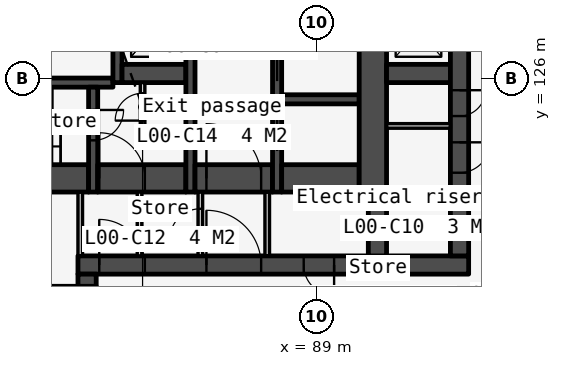
"""IFC4 building model, lengths in metres.
Left out: names, types, materials, properties, quantities, classifications, styles, units other than length and angle.
Written with IfcOpenShell. Run it as: python <this file> out.ifc"""

import sys

from ifc_helpers import new_model, si_unit, direction, frame, frame_2d, origin, place, context, subcontext, project, spatial, rectangle, extrude, element, fill, save


model = new_model("IFC4")
c1 = context("Model", 3, precision=1e-05, world=origin(), true_north=direction((0.0, 1.0)))
c2 = subcontext(c1, "Body", "Model", "MODEL_VIEW")
j1 = project(units=[si_unit("LENGTHUNIT", "METRE"), si_unit("PLANEANGLEUNIT", "RADIAN")], contexts=[c1])
p1 = place(None, origin())
s1 = spatial("IfcSite", under=j1, at=p1, CompositionType="ELEMENT")
p2 = place(p1, origin())
s2 = spatial("IfcBuilding", under=s1, at=p2, CompositionType="ELEMENT")
p3 = place(p2, origin())
s3 = spatial("IfcBuildingStorey", under=s2, at=p3, CompositionType="ELEMENT", Elevation=0.0)
p4 = place(p3, frame((74.3, 118.85, 0.0), z_axis=(0.0, 0.0, 1.0), x_axis=(1.0, 0.0, 0.0)))
e1 = element("IfcWall", 1, at=p4, inside=s3, PredefinedType="SOLIDWALL", context=c2, shape_type="SweptSolid", body=[
    extrude(rectangle(XDim=7.45, YDim=0.6, at=frame_2d((3.725, 0.0))), origin(), (0.0, 0.0, 1.0), 7.2),
])
p5 = place(p4, frame((3.225, 0.0, 0.0)))
e2 = element("IfcOpeningElement", 2, at=p5, cuts=e1, PredefinedType="OPENING", context=c2, shape_type="SweptSolid", body=[
    extrude(rectangle(XDim=1.0, YDim=2.1, at=frame_2d((0.5, 1.05))), frame((0.0, 0.31, 0.0), z_axis=(0.0, -1.0, 0.0), x_axis=(1.0, 0.0, 0.0)), (0.0, 0.0, 1.0), 0.62),
])
p6 = place(p3, frame((75.3, 122.7, 0.0), z_axis=(0.0, 0.0, 1.0), x_axis=(1.0, 0.0, 0.0)))
e3 = element("IfcWall", 3, at=p6, inside=s3, PredefinedType="SOLIDWALL", context=c2, shape_type="SweptSolid", body=[
    extrude(rectangle(XDim=6.2, YDim=0.9, at=frame_2d((3.1, 0.0))), origin(), (0.0, 0.0, 1.0), 7.2),
])
p7 = place(p3, frame((77.7, 125.85, 0.0), z_axis=(0.0, 0.0, 1.0), x_axis=(1.0, 0.0, 0.0)))
e4 = element("IfcWall", 4, at=p7, inside=s3, PredefinedType="SOLIDWALL", context=c2, shape_type="SweptSolid", body=[
    extrude(rectangle(XDim=4.6, YDim=0.3, at=frame_2d((2.3, 0.0))), origin(), (0.0, 0.0, 1.0), 7.2),
])
p8 = place(p3, frame((81.225, 122.25, 0.0), z_axis=(0.0, 0.0, 1.0), x_axis=(0.0, -1.0, 0.0)))
e5 = element("IfcWall", 5, at=p8, inside=s3, PredefinedType="PARTITIONING", context=c2, shape_type="SweptSolid", body=[
    extrude(rectangle(XDim=2.1, YDim=0.15, at=frame_2d((1.05, 0.0))), origin(), (0.0, 0.0, 1.0), 7.2),
])
p9 = place(p3, frame((81.15, 119.85, 0.0), z_axis=(0.0, 0.0, 1.0), x_axis=(1.0, 0.0, 0.0)))
e6 = element("IfcWall", 6, at=p9, inside=s3, PredefinedType="SOLIDWALL", context=c2, shape_type="SweptSolid", body=[
    extrude(rectangle(XDim=12.85, YDim=0.6, at=frame_2d((6.425, 0.0))), origin(), (0.0, 0.0, 1.0), 7.2),
])
p10 = place(p9, frame((0.7, 0.0, 0.0)))
e7 = element("IfcOpeningElement", 7, at=p10, cuts=e6, PredefinedType="OPENING", context=c2, shape_type="SweptSolid", body=[
    extrude(rectangle(XDim=1.5, YDim=2.1, at=frame_2d((0.75, 1.05))), frame((0.0, 0.31, 0.0), z_axis=(0.0, -1.0, 0.0), x_axis=(1.0, 0.0, 0.0)), (0.0, 0.0, 1.0), 0.62),
])
p11 = place(p9, frame((4.225, 0.0, 0.0)))
e8 = element("IfcOpeningElement", 8, at=p11, cuts=e6, PredefinedType="OPENING", context=c2, shape_type="SweptSolid", body=[
    extrude(rectangle(XDim=1.8, YDim=2.1, at=frame_2d((0.9, 1.05))), frame((0.0, 0.31, 0.0), z_axis=(0.0, -1.0, 0.0), x_axis=(1.0, 0.0, 0.0)), (0.0, 0.0, 1.0), 0.62),
])
p12 = place(p9, frame((7.425, 0.0, 0.0)))
e9 = element("IfcOpeningElement", 9, at=p12, cuts=e6, PredefinedType="OPENING", context=c2, shape_type="SweptSolid", body=[
    extrude(rectangle(XDim=1.0, YDim=2.1, at=frame_2d((0.5, 1.05))), frame((0.0, 0.31, 0.0), z_axis=(0.0, -1.0, 0.0), x_axis=(1.0, 0.0, 0.0)), (0.0, 0.0, 1.0), 0.62),
])
p13 = place(p3, frame((81.15, 119.35, 0.0), z_axis=(0.0, 0.0, 1.0), x_axis=(1.0, 0.0, 0.0)))
e10 = element("IfcWall", 10, at=p13, inside=s3, PredefinedType="SOLIDWALL", context=c2, shape_type="SweptSolid", body=[
    extrude(rectangle(XDim=0.6, YDim=0.4, at=frame_2d((0.3, 0.0))), origin(), (0.0, 0.0, 1.0), 7.2),
])
p14 = place(p3, frame((81.65, 125.7, 0.0), z_axis=(0.0, 0.0, 1.0), x_axis=(0.0, -1.0, 0.0)))
e11 = element("IfcWall", 11, at=p14, inside=s3, PredefinedType="SOLIDWALL", context=c2, shape_type="SweptSolid", body=[
    extrude(rectangle(XDim=3.45, YDim=0.3, at=frame_2d((1.725, 0.0))), origin(), (0.0, 0.0, 1.0), 7.2),
])
p15 = place(p14, frame((0.75, 0.0, 0.0)))
e12 = element("IfcOpeningElement", 12, at=p15, cuts=e11, PredefinedType="OPENING", context=c2, shape_type="SweptSolid", body=[
    extrude(rectangle(XDim=1.0, YDim=2.1, at=frame_2d((0.5, 1.05))), frame((0.0, 0.16, 0.0), z_axis=(0.0, -1.0, 0.0), x_axis=(1.0, 0.0, 0.0)), (0.0, 0.0, 1.0), 0.32),
])
p16 = place(p3, frame((81.8, 122.7, 0.0), z_axis=(0.0, 0.0, 1.0), x_axis=(1.0, 0.0, 0.0)))
e13 = element("IfcWall", 13, at=p16, inside=s3, PredefinedType="SOLIDWALL", context=c2, shape_type="SweptSolid", body=[
    extrude(rectangle(XDim=2.9, YDim=0.9, at=frame_2d((1.45, 0.0))), origin(), (0.0, 0.0, 1.0), 7.2),
])
p17 = place(p16, frame((0.05, 0.0, 0.0)))
e14 = element("IfcOpeningElement", 14, at=p17, cuts=e13, PredefinedType="OPENING", context=c2, shape_type="SweptSolid", body=[
    extrude(rectangle(XDim=1.5, YDim=2.1, at=frame_2d((0.75, 1.05))), frame((0.0, 0.46, 0.0), z_axis=(0.0, -1.0, 0.0), x_axis=(1.0, 0.0, 0.0)), (0.0, 0.0, 1.0), 0.92),
])
p18 = place(p3, frame((82.45, 133.95, 0.0), z_axis=(0.0, 0.0, 1.0), x_axis=(0.0, -1.0, 0.0)))
e15 = element("IfcWall", 15, at=p18, inside=s3, PredefinedType="SOLIDWALL", context=c2, shape_type="SweptSolid", body=[
    extrude(rectangle(XDim=8.1, YDim=0.3, at=frame_2d((4.05, 0.0))), origin(), (0.0, 0.0, 1.0), 7.2),
])
p19 = place(p18, frame((0.6, 0.0, 0.0)))
e16 = element("IfcOpeningElement", 16, at=p19, cuts=e15, PredefinedType="OPENING", context=c2, shape_type="SweptSolid", body=[
    extrude(rectangle(XDim=1.1, YDim=2.1, at=frame_2d((0.55, 1.05))), frame((0.0, 0.16, 0.0), z_axis=(0.0, -1.0, 0.0), x_axis=(1.0, 0.0, 0.0)), (0.0, 0.0, 1.0), 0.32),
])
p20 = place(p18, frame((3.2, 0.0, 0.0)))
e17 = element("IfcOpeningElement", 17, at=p20, cuts=e15, PredefinedType="OPENING", context=c2, shape_type="SweptSolid", body=[
    extrude(rectangle(XDim=1.1, YDim=2.1, at=frame_2d((0.55, 1.05))), frame((0.0, 0.16, 0.0), z_axis=(0.0, -1.0, 0.0), x_axis=(1.0, 0.0, 0.0)), (0.0, 0.0, 1.0), 0.32),
])
p21 = place(p18, frame((5.8, 0.0, 0.0)))
e18 = element("IfcOpeningElement", 18, at=p21, cuts=e15, PredefinedType="OPENING", context=c2, shape_type="SweptSolid", body=[
    extrude(rectangle(XDim=1.1, YDim=2.1, at=frame_2d((0.55, 1.05))), frame((0.0, 0.16, 0.0), z_axis=(0.0, -1.0, 0.0), x_axis=(1.0, 0.0, 0.0)), (0.0, 0.0, 1.0), 0.32),
])
p22 = place(p3, frame((82.6, 126.15, 0.0), z_axis=(0.0, 0.0, 1.0), x_axis=(1.0, 0.0, 0.0)))
e19 = element("IfcWall", 19, at=p22, inside=s3, PredefinedType="SOLIDWALL", context=c2, shape_type="SweptSolid", body=[
    extrude(rectangle(XDim=2.1, YDim=0.6, at=frame_2d((1.05, 0.0))), origin(), (0.0, 0.0, 1.0), 7.2),
])
p23 = place(p3, frame((83.175, 122.25, 0.0), z_axis=(0.0, 0.0, 1.0), x_axis=(0.0, -1.0, 0.0)))
e20 = element("IfcWall", 20, at=p23, inside=s3, PredefinedType="PARTITIONING", context=c2, shape_type="SweptSolid", body=[
    extrude(rectangle(XDim=2.1, YDim=0.15, at=frame_2d((1.05, 0.0))), origin(), (0.0, 0.0, 1.0), 7.2),
])
p24 = place(p3, frame((83.275, 125.85, 0.0), z_axis=(0.0, 0.0, 1.0), x_axis=(0.0, -1.0, 0.0)))
e21 = element("IfcWall", 21, at=p24, inside=s3, PredefinedType="PARTITIONING", context=c2, shape_type="SweptSolid", body=[
    extrude(rectangle(XDim=1.75, YDim=0.15, at=frame_2d((0.875, 0.0))), origin(), (0.0, 0.0, 1.0), 7.2),
])
p25 = place(p24, frame((0.35, 0.0, 0.0)))
e22 = element("IfcOpeningElement", 22, at=p25, cuts=e21, PredefinedType="OPENING", context=c2, shape_type="SweptSolid", body=[
    extrude(rectangle(XDim=0.9, YDim=2.1, at=frame_2d((0.45, 1.05))), frame((0.0, 0.085, 0.0), z_axis=(0.0, -1.0, 0.0), x_axis=(1.0, 0.0, 0.0)), (0.0, 0.0, 1.0), 0.17),
])
p26 = place(p3, frame((83.35, 124.175, 0.0), z_axis=(0.0, 0.0, 1.0), x_axis=(1.0, 0.0, 0.0)))
e23 = element("IfcWall", 23, at=p26, inside=s3, PredefinedType="PARTITIONING", context=c2, shape_type="SweptSolid", body=[
    extrude(rectangle(XDim=1.35, YDim=0.15, at=frame_2d((0.675, 0.0))), origin(), (0.0, 0.0, 1.0), 7.2),
])
p27 = place(p3, frame((84.85, 133.95, 0.0), z_axis=(0.0, 0.0, 1.0), x_axis=(0.0, -1.0, 0.0)))
e24 = element("IfcWall", 24, at=p27, inside=s3, PredefinedType="SOLIDWALL", context=c2, shape_type="SweptSolid", body=[
    extrude(rectangle(XDim=11.7, YDim=0.3, at=frame_2d((5.85, 0.0))), origin(), (0.0, 0.0, 1.0), 7.2),
])
p28 = place(p3, frame((85.0, 122.7, 0.0), z_axis=(0.0, 0.0, 1.0), x_axis=(1.0, 0.0, 0.0)))
e25 = element("IfcWall", 25, at=p28, inside=s3, PredefinedType="SOLIDWALL", context=c2, shape_type="SweptSolid", body=[
    extrude(rectangle(XDim=2.55, YDim=0.9, at=frame_2d((1.275, 0.0))), origin(), (0.0, 0.0, 1.0), 7.2),
])
p29 = place(p28, frame((0.375, 0.0, 0.0)))
e26 = element("IfcOpeningElement", 26, at=p29, cuts=e25, PredefinedType="OPENING", context=c2, shape_type="SweptSolid", body=[
    extrude(rectangle(XDim=1.8, YDim=2.1, at=frame_2d((0.9, 1.05))), frame((0.0, 0.46, 0.0), z_axis=(0.0, -1.0, 0.0), x_axis=(1.0, 0.0, 0.0)), (0.0, 0.0, 1.0), 0.92),
])
p30 = place(p3, frame((85.175, 122.25, 0.0), z_axis=(0.0, 0.0, 1.0), x_axis=(0.0, -1.0, 0.0)))
e27 = element("IfcWall", 27, at=p30, inside=s3, PredefinedType="PARTITIONING", context=c2, shape_type="SweptSolid", body=[
    extrude(rectangle(XDim=2.1, YDim=0.15, at=frame_2d((1.05, 0.0))), origin(), (0.0, 0.0, 1.0), 7.2),
])
p31 = place(p30, frame((0.55, 0.0, 0.0)))
e28 = element("IfcOpeningElement", 28, at=p31, cuts=e27, PredefinedType="OPENING", context=c2, shape_type="SweptSolid", body=[
    extrude(rectangle(XDim=1.0, YDim=2.1, at=frame_2d((0.5, 1.05))), frame((0.0, 0.085, 0.0), z_axis=(0.0, -1.0, 0.0), x_axis=(1.0, 0.0, 0.0)), (0.0, 0.0, 1.0), 0.17),
])
p32 = place(p3, frame((87.375, 122.25, 0.0), z_axis=(0.0, 0.0, 1.0), x_axis=(0.0, -1.0, 0.0)))
e29 = element("IfcWall", 29, at=p32, inside=s3, PredefinedType="PARTITIONING", context=c2, shape_type="SweptSolid", body=[
    extrude(rectangle(XDim=2.1, YDim=0.15, at=frame_2d((1.05, 0.0))), origin(), (0.0, 0.0, 1.0), 7.2),
])
p33 = place(p3, frame((87.7, 133.95, 0.0), z_axis=(0.0, 0.0, 1.0), x_axis=(0.0, -1.0, 0.0)))
e30 = element("IfcWall", 30, at=p33, inside=s3, PredefinedType="SOLIDWALL", context=c2, shape_type="SweptSolid", body=[
    extrude(rectangle(XDim=11.7, YDim=0.3, at=frame_2d((5.85, 0.0))), origin(), (0.0, 0.0, 1.0), 7.2),
])
p34 = place(p33, frame((6.95, 0.0, 0.0)))
e31 = element("IfcOpeningElement", 31, at=p34, cuts=e30, PredefinedType="OPENING", context=c2, shape_type="SweptSolid", body=[
    extrude(rectangle(XDim=1.1, YDim=2.1, at=frame_2d((0.55, 1.05))), frame((0.0, 0.16, 0.0), z_axis=(0.0, -1.0, 0.0), x_axis=(1.0, 0.0, 0.0)), (0.0, 0.0, 1.0), 0.32),
])
p35 = place(p33, frame((5.1, 0.0, 0.0)))
e32 = element("IfcOpeningElement", 32, at=p35, cuts=e30, PredefinedType="OPENING", context=c2, shape_type="SweptSolid", body=[
    extrude(rectangle(XDim=1.0, YDim=2.1, at=frame_2d((0.5, 1.05))), frame((0.0, 0.16, 0.0), z_axis=(0.0, -1.0, 0.0), x_axis=(1.0, 0.0, 0.0)), (0.0, 0.0, 1.0), 0.32),
])
p36 = place(p33, frame((9.25, 0.0, 0.0)))
e33 = element("IfcOpeningElement", 33, at=p36, cuts=e30, PredefinedType="OPENING", context=c2, shape_type="SweptSolid", body=[
    extrude(rectangle(XDim=1.1, YDim=2.1, at=frame_2d((0.55, 1.05))), frame((0.0, 0.16, 0.0), z_axis=(0.0, -1.0, 0.0), x_axis=(1.0, 0.0, 0.0)), (0.0, 0.0, 1.0), 0.32),
])
p37 = place(p3, frame((87.85, 125.3, 0.0), z_axis=(0.0, 0.0, 1.0), x_axis=(1.0, 0.0, 0.0)))
e34 = element("IfcWall", 34, at=p37, inside=s3, PredefinedType="SOLIDWALL", context=c2, shape_type="SweptSolid", body=[
    extrude(rectangle(XDim=2.55, YDim=0.3, at=frame_2d((1.275, 0.0))), origin(), (0.0, 0.0, 1.0), 7.2),
])
p38 = place(p3, frame((87.85, 122.7, 0.0), z_axis=(0.0, 0.0, 1.0), x_axis=(1.0, 0.0, 0.0)))
e35 = element("IfcWall", 35, at=p38, inside=s3, PredefinedType="SOLIDWALL", context=c2, shape_type="SweptSolid", body=[
    extrude(rectangle(XDim=2.55, YDim=0.9, at=frame_2d((1.275, 0.0))), origin(), (0.0, 0.0, 1.0), 7.2),
])
p39 = place(p3, frame((90.85, 133.95, 0.0), z_axis=(0.0, 0.0, 1.0), x_axis=(0.0, -1.0, 0.0)))
e36 = element("IfcWall", 36, at=p39, inside=s3, PredefinedType="SOLIDWALL", context=c2, shape_type="SweptSolid", body=[
    extrude(rectangle(XDim=11.7, YDim=0.9, at=frame_2d((5.85, 0.0))), origin(), (0.0, 0.0, 1.0), 7.2),
])
p40 = place(p3, frame((91.0, 122.25, 0.0), z_axis=(0.0, 0.0, 1.0), x_axis=(0.0, -1.0, 0.0)))
e37 = element("IfcWall", 37, at=p40, inside=s3, PredefinedType="SOLIDWALL", context=c2, shape_type="SweptSolid", body=[
    extrude(rectangle(XDim=2.1, YDim=0.6, at=frame_2d((1.05, 0.0))), origin(), (0.0, 0.0, 1.0), 7.2),
])
p41 = place(p3, frame((91.3, 126.15, 0.0), z_axis=(0.0, 0.0, 1.0), x_axis=(1.0, 0.0, 0.0)))
e38 = element("IfcWall", 38, at=p41, inside=s3, PredefinedType="SOLIDWALL", context=c2, shape_type="SweptSolid", body=[
    extrude(rectangle(XDim=2.1, YDim=0.6, at=frame_2d((1.05, 0.0))), origin(), (0.0, 0.0, 1.0), 7.2),
])
for number, where, z_axis, x_axis in (
    (39, (91.3, 124.425, 0.0), (0.0, 0.0, 1.0), (1.0, 0.0, 0.0)),
    (40, (91.3, 122.346, 0.0), (0.0, 0.0, 1.0), (1.0, 0.0, 0.0)),
):
    element("IfcWall", number, at=place(p3, frame(where, z_axis=z_axis, x_axis=x_axis)), inside=s3, PredefinedType="PARTITIONING", context=c2, shape_type="SweptSolid", body=[
        extrude(rectangle(XDim=2.1, YDim=0.15, at=frame_2d((1.05, 0.0))), origin(), (0.0, 0.0, 1.0), 7.2),
    ])
p42 = place(p3, frame((93.7, 133.95, 0.0), z_axis=(0.0, 0.0, 1.0), x_axis=(0.0, -1.0, 0.0)))
e41 = element("IfcWall", 41, at=p42, inside=s3, PredefinedType="SOLIDWALL", context=c2, shape_type="SweptSolid", body=[
    extrude(rectangle(XDim=13.8, YDim=0.6, at=frame_2d((6.9, 0.0))), origin(), (0.0, 0.0, 1.0), 7.2),
])
p43 = place(p42, frame((0.6, 0.0, 0.0)))
e42 = element("IfcOpeningElement", 42, at=p43, cuts=e41, PredefinedType="OPENING", context=c2, shape_type="SweptSolid", body=[
    extrude(rectangle(XDim=1.1, YDim=2.1, at=frame_2d((0.55, 1.05))), frame((0.0, 0.31, 0.0), z_axis=(0.0, -1.0, 0.0), x_axis=(1.0, 0.0, 0.0)), (0.0, 0.0, 1.0), 0.62),
])
p44 = place(p42, frame((10.064, 0.0, 0.0)))
e43 = element("IfcOpeningElement", 43, at=p44, cuts=e41, PredefinedType="OPENING", context=c2, shape_type="SweptSolid", body=[
    extrude(rectangle(XDim=1.0, YDim=2.1, at=frame_2d((0.5, 1.05))), frame((0.0, 0.31, 0.0), z_axis=(0.0, -1.0, 0.0), x_axis=(1.0, 0.0, 0.0)), (0.0, 0.0, 1.0), 0.62),
])
p45 = place(p42, frame((8.35, 0.0, 0.0)))
e44 = element("IfcOpeningElement", 44, at=p45, cuts=e41, PredefinedType="OPENING", context=c2, shape_type="SweptSolid", body=[
    extrude(rectangle(XDim=0.85, YDim=2.1, at=frame_2d((0.425, 1.05))), frame((0.0, 0.31, 0.0), z_axis=(0.0, -1.0, 0.0), x_axis=(1.0, 0.0, 0.0)), (0.0, 0.0, 1.0), 0.62),
])
p46 = place(p42, frame((12.239, 0.0, 0.0)))
e45 = element("IfcOpeningElement", 45, at=p46, cuts=e41, PredefinedType="OPENING", context=c2, shape_type="SweptSolid", body=[
    extrude(rectangle(XDim=1.0, YDim=2.1, at=frame_2d((0.5, 1.05))), frame((0.0, 0.31, 0.0), z_axis=(0.0, -1.0, 0.0), x_axis=(1.0, 0.0, 0.0)), (0.0, 0.0, 1.0), 0.62),
])
p47 = place(p42, frame((3.2, 0.0, 0.0)))
e46 = element("IfcOpeningElement", 46, at=p47, cuts=e41, PredefinedType="OPENING", context=c2, shape_type="SweptSolid", body=[
    extrude(rectangle(XDim=1.1, YDim=2.1, at=frame_2d((0.55, 1.05))), frame((0.0, 0.31, 0.0), z_axis=(0.0, -1.0, 0.0), x_axis=(1.0, 0.0, 0.0)), (0.0, 0.0, 1.0), 0.62),
])
p48 = place(p42, frame((5.8, 0.0, 0.0)))
e47 = element("IfcOpeningElement", 47, at=p48, cuts=e41, PredefinedType="OPENING", context=c2, shape_type="SweptSolid", body=[
    extrude(rectangle(XDim=1.1, YDim=2.1, at=frame_2d((0.55, 1.05))), frame((0.0, 0.31, 0.0), z_axis=(0.0, -1.0, 0.0), x_axis=(1.0, 0.0, 0.0)), (0.0, 0.0, 1.0), 0.62),
])
p49 = place(p44, origin())
e48 = element("IfcDoor", 48, at=p49, inside=s3, OperationType="SINGLE_SWING_LEFT", PredefinedType="DOOR", context=c2, shape_type="SweptSolid", body=[
    extrude(rectangle(XDim=1.0, YDim=2.1, at=frame_2d((0.5, 1.05))), frame((0.0, 0.025, 0.0), z_axis=(0.0, -1.0, 0.0), x_axis=(1.0, 0.0, 0.0)), (0.0, 0.0, 1.0), 0.05),
])
fill(e43, e48)
p50 = place(p45, origin())
e49 = element("IfcDoor", 49, at=p50, inside=s3, OperationType="SINGLE_SWING_LEFT", PredefinedType="DOOR", context=c2, shape_type="SweptSolid", body=[
    extrude(rectangle(XDim=0.85, YDim=2.1, at=frame_2d((0.425, 1.05))), frame((0.0, 0.025, 0.0), z_axis=(0.0, -1.0, 0.0), x_axis=(1.0, 0.0, 0.0)), (0.0, 0.0, 1.0), 0.05),
])
fill(e44, e49)
p51 = place(p46, origin())
e50 = element("IfcDoor", 50, at=p51, inside=s3, OperationType="SINGLE_SWING_LEFT", PredefinedType="DOOR", context=c2, shape_type="SweptSolid", body=[
    extrude(rectangle(XDim=1.0, YDim=2.1, at=frame_2d((0.5, 1.05))), frame((0.0, 0.025, 0.0), z_axis=(0.0, -1.0, 0.0), x_axis=(1.0, 0.0, 0.0)), (0.0, 0.0, 1.0), 0.05),
])
fill(e45, e50)
p52 = place(p34, origin())
e51 = element("IfcDoor", 51, at=p52, inside=s3, OperationType="SLIDING_TO_LEFT", PredefinedType="DOOR", context=c2, shape_type="SweptSolid", body=[
    extrude(rectangle(XDim=1.1, YDim=2.1, at=frame_2d((0.55, 1.05))), frame((0.0, 0.025, 0.0), z_axis=(0.0, -1.0, 0.0), x_axis=(1.0, 0.0, 0.0)), (0.0, 0.0, 1.0), 0.05),
])
fill(e31, e51)
p53 = place(p29, origin())
e52 = element("IfcDoor", 52, at=p53, inside=s3, OperationType="DOUBLE_DOOR_DOUBLE_SWING", PredefinedType="DOOR", context=c2, shape_type="SweptSolid", body=[
    extrude(rectangle(XDim=1.8, YDim=2.1, at=frame_2d((0.9, 1.05))), frame((0.0, 0.025, 0.0), z_axis=(0.0, -1.0, 0.0), x_axis=(1.0, 0.0, 0.0)), (0.0, 0.0, 1.0), 0.05),
])
fill(e26, e52)
p54 = place(p17, origin())
e53 = element("IfcDoor", 53, at=p54, inside=s3, OperationType="DOUBLE_DOOR_DOUBLE_SWING", PredefinedType="DOOR", context=c2, shape_type="SweptSolid", body=[
    extrude(rectangle(XDim=1.5, YDim=2.1, at=frame_2d((0.75, 1.05))), frame((0.0, 0.025, 0.0), z_axis=(0.0, -1.0, 0.0), x_axis=(1.0, 0.0, 0.0)), (0.0, 0.0, 1.0), 0.05),
])
fill(e14, e53)
p55 = place(p10, origin())
e54 = element("IfcDoor", 54, at=p55, inside=s3, OperationType="DOUBLE_DOOR_DOUBLE_SWING", PredefinedType="DOOR", context=c2, shape_type="SweptSolid", body=[
    extrude(rectangle(XDim=1.5, YDim=2.1, at=frame_2d((0.75, 1.05))), frame((0.0, 0.025, 0.0), z_axis=(0.0, -1.0, 0.0), x_axis=(1.0, 0.0, 0.0)), (0.0, 0.0, 1.0), 0.05),
])
fill(e7, e54)
p56 = place(p11, origin())
e55 = element("IfcDoor", 55, at=p56, inside=s3, OperationType="DOUBLE_DOOR_DOUBLE_SWING", PredefinedType="DOOR", context=c2, shape_type="SweptSolid", body=[
    extrude(rectangle(XDim=1.8, YDim=2.1, at=frame_2d((0.9, 1.05))), frame((0.0, 0.025, 0.0), z_axis=(0.0, -1.0, 0.0), x_axis=(1.0, 0.0, 0.0)), (0.0, 0.0, 1.0), 0.05),
])
fill(e8, e55)
p57 = place(p25, origin())
e56 = element("IfcDoor", 56, at=p57, inside=s3, OperationType="SINGLE_SWING_RIGHT", PredefinedType="DOOR", context=c2, shape_type="SweptSolid", body=[
    extrude(rectangle(XDim=0.9, YDim=2.1, at=frame_2d((0.45, 1.05))), frame((0.0, 0.025, 0.0), z_axis=(0.0, -1.0, 0.0), x_axis=(1.0, 0.0, 0.0)), (0.0, 0.0, 1.0), 0.05),
])
fill(e22, e56)
p58 = place(p31, origin())
e57 = element("IfcDoor", 57, at=p58, inside=s3, OperationType="SINGLE_SWING_RIGHT", PredefinedType="DOOR", context=c2, shape_type="SweptSolid", body=[
    extrude(rectangle(XDim=1.0, YDim=2.1, at=frame_2d((0.5, 1.05))), frame((0.0, 0.025, 0.0), z_axis=(0.0, -1.0, 0.0), x_axis=(1.0, 0.0, 0.0)), (0.0, 0.0, 1.0), 0.05),
])
fill(e28, e57)
p59 = place(p12, origin())
e58 = element("IfcDoor", 58, at=p59, inside=s3, OperationType="SINGLE_SWING_RIGHT", PredefinedType="DOOR", context=c2, shape_type="SweptSolid", body=[
    extrude(rectangle(XDim=1.0, YDim=2.1, at=frame_2d((0.5, 1.05))), frame((0.0, 0.025, 0.0), z_axis=(0.0, -1.0, 0.0), x_axis=(1.0, 0.0, 0.0)), (0.0, 0.0, 1.0), 0.05),
])
fill(e9, e58)
p60 = place(p15, origin())
e59 = element("IfcDoor", 59, at=p60, inside=s3, OperationType="SINGLE_SWING_LEFT", PredefinedType="DOOR", context=c2, shape_type="SweptSolid", body=[
    extrude(rectangle(XDim=1.0, YDim=2.1, at=frame_2d((0.5, 1.05))), frame((0.0, 0.025, 0.0), z_axis=(0.0, -1.0, 0.0), x_axis=(1.0, 0.0, 0.0)), (0.0, 0.0, 1.0), 0.05),
])
fill(e12, e59)
p61 = place(p36, origin())
e60 = element("IfcDoor", 60, at=p61, inside=s3, OperationType="SLIDING_TO_LEFT", PredefinedType="DOOR", context=c2, shape_type="SweptSolid", body=[
    extrude(rectangle(XDim=1.1, YDim=2.1, at=frame_2d((0.55, 1.05))), frame((0.0, 0.025, 0.0), z_axis=(0.0, -1.0, 0.0), x_axis=(1.0, 0.0, 0.0)), (0.0, 0.0, 1.0), 0.05),
])
fill(e33, e60)
save(model, sys.argv[1])
